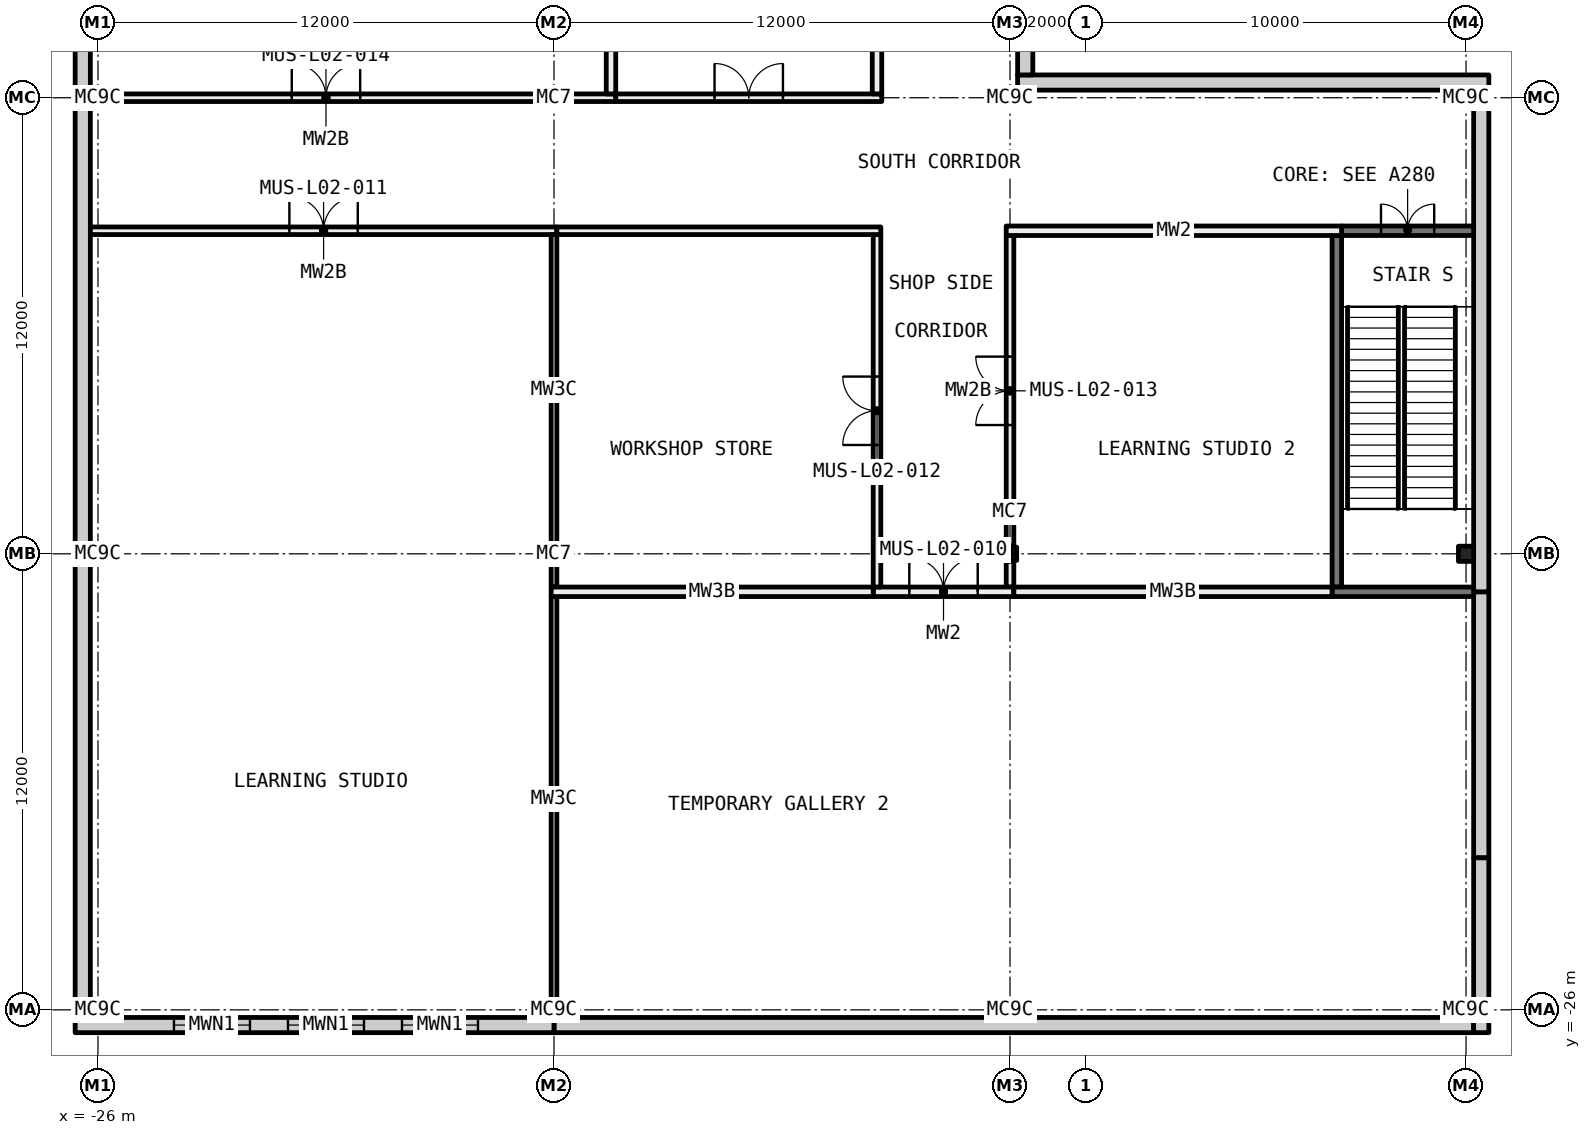
"""IFC4 building model, lengths in metres.
Left out: names, types, materials, properties, quantities, classifications, styles, units other than length and angle.
Written with IfcOpenShell. Run it as: python <this file> out.ifc"""

import sys

from ifc_helpers import new_model, si_unit, direction, frame, frame_2d, origin, origin_2d, place, context, subcontext, project, spatial, rectangle, i_section, extrude, element, fill, save


model = new_model("IFC4")
c1 = context("Model", 3, precision=1e-05, world=origin(), true_north=direction((0.0, 1.0)))
c2 = subcontext(c1, "Body", "Model", "MODEL_VIEW")
j1 = project(units=[si_unit("LENGTHUNIT", "METRE"), si_unit("PLANEANGLEUNIT", "RADIAN")], contexts=[c1])
p1 = place(None, origin())
s1 = spatial("IfcSite", under=j1, at=p1, CompositionType="ELEMENT")
p2 = place(p1, origin())
s2 = spatial("IfcBuilding", under=s1, at=p2, CompositionType="ELEMENT")
p3 = place(p2, frame((0.0, 0.0, 12.0)))
s3 = spatial("IfcBuildingStorey", under=s2, at=p3, CompositionType="ELEMENT", Elevation=12.0)
for number, where, z_axis, x_axis in (
    (1, (-26.0, -26.0, 0.0), (0.0, 0.0, 1.0), (1.0, 0.0, 0.0)),
    (2, (-26.0, -14.0, 0.0), (0.0, 0.0, 1.0), (1.0, 0.0, 0.0)),
    (3, (-26.0, -2.0, 0.0), (0.0, 0.0, 1.0), (1.0, 0.0, 0.0)),
    (4, (-14.0, -26.0, 0.0), (0.0, 0.0, 1.0), (1.0, 0.0, 0.0)),
):
    element("IfcColumn", number, at=place(p3, frame(where, z_axis=z_axis, x_axis=x_axis)), inside=s3, PredefinedType="COLUMN", context=c2, shape_type="SweptSolid", body=[
        extrude(i_section(OverallWidth=0.4, OverallDepth=0.4, WebThickness=0.013, FlangeThickness=0.021, FilletRadius=0.022, at=origin_2d()), origin(), (0.0, 0.0, 1.0), 5.6),
    ])
for number, where, z_axis, x_axis in (
    (5, (-14.0, -14.0, 0.0), (0.0, 0.0, 1.0), (1.0, 0.0, 0.0)),
    (6, (-14.0, -2.0, 0.0), (0.0, 0.0, 1.0), (1.0, 0.0, 0.0)),
):
    element("IfcColumn", number, at=place(p3, frame(where, z_axis=z_axis, x_axis=x_axis)), inside=s3, PredefinedType="COLUMN", context=c2, shape_type="SweptSolid", body=[
        extrude(i_section(OverallWidth=0.35, OverallDepth=0.35, WebThickness=0.012, FlangeThickness=0.019, FilletRadius=0.013, at=origin_2d()), origin(), (0.0, 0.0, 1.0), 5.6),
    ])
p4 = place(p3, frame((-2.0, -26.0, 0.0), z_axis=(0.0, 0.0, 1.0), x_axis=(1.0, 0.0, 0.0)))
e7 = element("IfcColumn", 7, at=p4, inside=s3, PredefinedType="COLUMN", context=c2, shape_type="SweptSolid", body=[
    extrude(i_section(OverallWidth=0.4, OverallDepth=0.4, WebThickness=0.013, FlangeThickness=0.021, FilletRadius=0.022, at=origin_2d()), origin(), (0.0, 0.0, 1.0), 5.6),
])
p5 = place(p3, frame((-2.0, -14.0, 0.0), z_axis=(0.0, 0.0, 1.0), x_axis=(1.0, 0.0, 0.0)))
e8 = element("IfcColumn", 8, at=p5, inside=s3, PredefinedType="COLUMN", context=c2, shape_type="SweptSolid", body=[
    extrude(i_section(OverallWidth=0.35, OverallDepth=0.35, WebThickness=0.012, FlangeThickness=0.019, FilletRadius=0.013, at=origin_2d()), origin(), (0.0, 0.0, 1.0), 5.6),
])
for number, where, z_axis, x_axis in (
    (9, (-2.0, -2.0, 0.0), (0.0, 0.0, 1.0), (1.0, 0.0, 0.0)),
    (10, (10.0, -26.0, 0.0), (0.0, 0.0, 1.0), (1.0, 0.0, 0.0)),
    (11, (10.0, -14.0, 0.0), (0.0, 0.0, 1.0), (1.0, 0.0, 0.0)),
    (12, (10.0, -2.0, 0.0), (0.0, 0.0, 1.0), (1.0, 0.0, 0.0)),
):
    element("IfcColumn", number, at=place(p3, frame(where, z_axis=z_axis, x_axis=x_axis)), inside=s3, PredefinedType="COLUMN", context=c2, shape_type="SweptSolid", body=[
        extrude(i_section(OverallWidth=0.4, OverallDepth=0.4, WebThickness=0.013, FlangeThickness=0.021, FilletRadius=0.022, at=origin_2d()), origin(), (0.0, 0.0, 1.0), 5.6),
    ])
p6 = place(p3, frame((-25.8, -2.0, 0.0), z_axis=(0.0, 0.0, 1.0), x_axis=(1.0, 0.0, 0.0)))
e13 = element("IfcWall", 13, at=p6, inside=s3, PredefinedType="PARTITIONING", context=c2, shape_type="SweptSolid", body=[
    extrude(rectangle(XDim=11.6, YDim=0.2, at=frame_2d((5.8, 0.0))), origin(), (0.0, 0.0, 1.0), 5.012),
])
p7 = place(p6, frame((4.9, 0.0, 0.0)))
e14 = element("IfcOpeningElement", 14, at=p7, cuts=e13, PredefinedType="OPENING", context=c2, shape_type="SweptSolid", body=[
    extrude(rectangle(XDim=1.8, YDim=2.1, at=frame_2d((0.9, 1.05))), frame((0.0, 0.11, 0.0), z_axis=(0.0, -1.0, 0.0), x_axis=(1.0, 0.0, 0.0)), (0.0, 0.0, 1.0), 0.22),
])
p8 = place(p3, frame((-13.8, -2.0, 0.0), z_axis=(0.0, 0.0, 1.0), x_axis=(1.0, 0.0, 0.0)))
e15 = element("IfcWall", 15, at=p8, inside=s3, PredefinedType="PARTITIONING", context=c2, shape_type="SweptSolid", body=[
    extrude(rectangle(XDim=1.425, YDim=0.2, at=frame_2d((0.712, 0.0))), origin(), (0.0, 0.0, 1.0), 5.012),
])
p9 = place(p3, frame((-26.2, -5.5, 0.0), z_axis=(0.0, 0.0, 1.0), x_axis=(1.0, 0.0, 0.0)))
e16 = element("IfcWall", 16, at=p9, inside=s3, PredefinedType="PARTITIONING", context=c2, shape_type="SweptSolid", body=[
    extrude(rectangle(XDim=12.275, YDim=0.2, at=frame_2d((6.137, 0.0))), origin(), (0.0, 0.0, 1.0), 5.6),
])
p10 = place(p9, frame((5.237, 0.0, 0.0)))
e17 = element("IfcOpeningElement", 17, at=p10, cuts=e16, PredefinedType="OPENING", context=c2, shape_type="SweptSolid", body=[
    extrude(rectangle(XDim=1.8, YDim=2.1, at=frame_2d((0.9, 1.05))), frame((0.0, 0.11, 0.0), z_axis=(0.0, -1.0, 0.0), x_axis=(1.0, 0.0, 0.0)), (0.0, 0.0, 1.0), 0.22),
])
p11 = place(p3, frame((-2.0, -14.875, 0.0), z_axis=(0.0, 0.0, 1.0), x_axis=(0.0, 1.0, 0.0)))
e18 = element("IfcWall", 18, at=p11, inside=s3, PredefinedType="PARTITIONING", context=c2, shape_type="SweptSolid", body=[
    extrude(rectangle(XDim=0.675, YDim=0.2, at=frame_2d((0.337, 0.0))), origin(), (0.0, 0.0, 1.0), 5.012),
])
p12 = place(p3, frame((-2.0, -13.8, 0.0), z_axis=(0.0, 0.0, 1.0), x_axis=(0.0, 1.0, 0.0)))
e19 = element("IfcWall", 19, at=p12, inside=s3, PredefinedType="PARTITIONING", context=c2, shape_type="SweptSolid", body=[
    extrude(rectangle(XDim=8.175, YDim=0.2, at=frame_2d((4.087, 0.0))), origin(), (0.0, 0.0, 1.0), 5.012),
])
p13 = place(p12, frame((3.188, 0.0, 0.0)))
e20 = element("IfcOpeningElement", 20, at=p13, cuts=e19, PredefinedType="OPENING", context=c2, shape_type="SweptSolid", body=[
    extrude(rectangle(XDim=1.8, YDim=2.1, at=frame_2d((0.9, 1.05))), frame((0.0, 0.11, 0.0), z_axis=(0.0, -1.0, 0.0), x_axis=(1.0, 0.0, 0.0)), (0.0, 0.0, 1.0), 0.22),
])
p14 = place(p3, frame((-2.1, -5.5, 0.0), z_axis=(0.0, 0.0, 1.0), x_axis=(1.0, 0.0, 0.0)))
e21 = element("IfcWall", 21, at=p14, inside=s3, PredefinedType="PARTITIONING", context=c2, shape_type="SweptSolid", body=[
    extrude(rectangle(XDim=8.825, YDim=0.25, at=frame_2d((4.413, 0.0))), origin(), (0.0, 0.0, 1.0), 5.6),
])
p15 = place(p3, frame((-12.375, -2.0, 0.0), z_axis=(0.0, 0.0, 1.0), x_axis=(1.0, 0.0, 0.0)))
e22 = element("IfcWall", 22, at=p15, inside=s3, PredefinedType="PARTITIONING", context=c2, shape_type="SweptSolid", body=[
    extrude(rectangle(XDim=7.0, YDim=0.2, at=frame_2d((3.5, 0.0))), origin(), (0.0, 0.0, 1.0), 5.012),
])
p16 = place(p15, frame((2.6, 0.0, 0.0)))
e23 = element("IfcOpeningElement", 23, at=p16, cuts=e22, PredefinedType="OPENING", context=c2, shape_type="SweptSolid", body=[
    extrude(rectangle(XDim=1.8, YDim=2.1, at=frame_2d((0.9, 1.05))), frame((0.0, 0.11, 0.0), z_axis=(0.0, -1.0, 0.0), x_axis=(1.0, 0.0, 0.0)), (0.0, 0.0, 1.0), 0.22),
])
p17 = place(p3, frame((-5.5, -1.9, 0.0), z_axis=(0.0, 0.0, 1.0), x_axis=(0.0, 1.0, 0.0)))
e24 = element("IfcWall", 24, at=p17, inside=s3, PredefinedType="PARTITIONING", context=c2, shape_type="SweptSolid", body=[
    extrude(rectangle(XDim=2.975, YDim=0.25, at=frame_2d((1.487, 0.0))), origin(), (0.0, 0.0, 1.0), 5.6),
])
p18 = place(p3, frame((6.725, -5.5, 0.0), z_axis=(0.0, 0.0, 1.0), x_axis=(1.0, 0.0, 0.0)))
e25 = element("IfcWall", 25, at=p18, inside=s3, PredefinedType="SHEAR", context=c2, shape_type="SweptSolid", body=[
    extrude(rectangle(XDim=3.475, YDim=0.25, at=frame_2d((1.737, 0.0))), origin(), (0.0, 0.0, 1.0), 5.6),
])
p19 = place(p18, frame((1.037, 0.0, 0.0)))
e26 = element("IfcOpeningElement", 26, at=p19, cuts=e25, PredefinedType="OPENING", context=c2, shape_type="SweptSolid", body=[
    extrude(rectangle(XDim=1.4, YDim=2.1, at=frame_2d((0.7, 1.05))), frame((0.0, 0.135, 0.0), z_axis=(0.0, -1.0, 0.0), x_axis=(1.0, 0.0, 0.0)), (0.0, 0.0, 1.0), 0.27),
])
p20 = place(p3, frame((-5.6, -15.0, 0.0), z_axis=(0.0, 0.0, 1.0), x_axis=(1.0, 0.0, 0.0)))
e27 = element("IfcWall", 27, at=p20, inside=s3, PredefinedType="PARTITIONING", context=c2, shape_type="SweptSolid", body=[
    extrude(rectangle(XDim=3.7, YDim=0.25, at=frame_2d((1.85, 0.0))), origin(), (0.0, 0.0, 1.0), 5.6),
])
p21 = place(p20, frame((0.95, 0.0, 0.0)))
e28 = element("IfcOpeningElement", 28, at=p21, cuts=e27, PredefinedType="OPENING", context=c2, shape_type="SweptSolid", body=[
    extrude(rectangle(XDim=1.8, YDim=2.1, at=frame_2d((0.9, 1.05))), frame((0.0, 0.135, 0.0), z_axis=(0.0, -1.0, 0.0), x_axis=(1.0, 0.0, 0.0)), (0.0, 0.0, 1.0), 0.27),
])
p22 = place(p3, frame((-5.5, -14.875, 0.0), z_axis=(0.0, 0.0, 1.0), x_axis=(0.0, 1.0, 0.0)))
e29 = element("IfcWall", 29, at=p22, inside=s3, PredefinedType="PARTITIONING", context=c2, shape_type="SweptSolid", body=[
    extrude(rectangle(XDim=9.275, YDim=0.2, at=frame_2d((4.637, 0.0))), origin(), (0.0, 0.0, 1.0), 5.6),
])
p23 = place(p22, frame((3.738, 0.0, 0.0)))
e30 = element("IfcOpeningElement", 30, at=p23, cuts=e29, PredefinedType="OPENING", context=c2, shape_type="SweptSolid", body=[
    extrude(rectangle(XDim=1.8, YDim=2.1, at=frame_2d((0.9, 1.05))), frame((0.0, 0.11, 0.0), z_axis=(0.0, -1.0, 0.0), x_axis=(1.0, 0.0, 0.0)), (0.0, 0.0, 1.0), 0.22),
])
p24 = place(p3, frame((-13.925, -5.5, 0.0), z_axis=(0.0, 0.0, 1.0), x_axis=(1.0, 0.0, 0.0)))
e31 = element("IfcWall", 31, at=p24, inside=s3, PredefinedType="PARTITIONING", context=c2, shape_type="SweptSolid", body=[
    extrude(rectangle(XDim=8.525, YDim=0.2, at=frame_2d((4.263, 0.0))), origin(), (0.0, 0.0, 1.0), 5.6),
])
p25 = place(p3, frame((-14.0, -14.875, 0.0), z_axis=(0.0, 0.0, 1.0), x_axis=(0.0, 1.0, 0.0)))
e32 = element("IfcWall", 32, at=p25, inside=s3, PredefinedType="PARTITIONING", context=c2, shape_type="SweptSolid", body=[
    extrude(rectangle(XDim=0.675, YDim=0.15, at=frame_2d((0.337, 0.0))), origin(), (0.0, 0.0, 1.0), 5.012),
])
p26 = place(p3, frame((-14.0, -13.8, 0.0), z_axis=(0.0, 0.0, 1.0), x_axis=(0.0, 1.0, 0.0)))
e33 = element("IfcWall", 33, at=p26, inside=s3, PredefinedType="PARTITIONING", context=c2, shape_type="SweptSolid", body=[
    extrude(rectangle(XDim=8.2, YDim=0.15, at=frame_2d((4.1, 0.0))), origin(), (0.0, 0.0, 1.0), 5.012),
])
p27 = place(p3, frame((-12.5, -1.9, 0.0), z_axis=(0.0, 0.0, 1.0), x_axis=(0.0, 1.0, 0.0)))
e34 = element("IfcWall", 34, at=p27, inside=s3, PredefinedType="PARTITIONING", context=c2, shape_type="SweptSolid", body=[
    extrude(rectangle(XDim=2.975, YDim=0.25, at=frame_2d((1.487, 0.0))), origin(), (0.0, 0.0, 1.0), 5.6),
])
p28 = place(p3, frame((6.6, -14.875, 0.0), z_axis=(0.0, 0.0, 1.0), x_axis=(0.0, 1.0, 0.0)))
e35 = element("IfcWall", 35, at=p28, inside=s3, PredefinedType="SHEAR", context=c2, shape_type="SweptSolid", body=[
    extrude(rectangle(XDim=9.25, YDim=0.25, at=frame_2d((4.625, 0.0))), origin(), (0.0, 0.0, 1.0), 5.6),
])
p29 = place(p3, frame((6.475, -15.0, 0.0), z_axis=(0.0, 0.0, 1.0), x_axis=(1.0, 0.0, 0.0)))
e36 = element("IfcWall", 36, at=p29, inside=s3, PredefinedType="SHEAR", context=c2, shape_type="SweptSolid", body=[
    extrude(rectangle(XDim=3.725, YDim=0.25, at=frame_2d((1.862, 0.0))), origin(), (0.0, 0.0, 1.0), 5.6),
])
p30 = place(p3, frame((-14.0, -25.8, 0.0), z_axis=(0.0, 0.0, 1.0), x_axis=(0.0, 1.0, 0.0)))
e37 = element("IfcWall", 37, at=p30, inside=s3, PredefinedType="PARTITIONING", context=c2, shape_type="SweptSolid", body=[
    extrude(rectangle(XDim=10.675, YDim=0.15, at=frame_2d((5.337, 0.0))), origin(), (0.0, 0.0, 1.0), 5.012),
])
p31 = place(p3, frame((-1.9, -15.0, 0.0), z_axis=(0.0, 0.0, 1.0), x_axis=(1.0, 0.0, 0.0)))
e38 = element("IfcWall", 38, at=p31, inside=s3, PredefinedType="PARTITIONING", context=c2, shape_type="SweptSolid", body=[
    extrude(rectangle(XDim=8.375, YDim=0.25, at=frame_2d((4.188, 0.0))), origin(), (0.0, 0.0, 1.0), 5.6),
])
p32 = place(p3, frame((-14.075, -15.0, 0.0), z_axis=(0.0, 0.0, 1.0), x_axis=(1.0, 0.0, 0.0)))
e39 = element("IfcWall", 39, at=p32, inside=s3, PredefinedType="PARTITIONING", context=c2, shape_type="SweptSolid", body=[
    extrude(rectangle(XDim=8.475, YDim=0.25, at=frame_2d((4.237, 0.0))), origin(), (0.0, 0.0, 1.0), 5.6),
])
p33 = place(p3, frame((-14.0, -26.4, 0.0), z_axis=(0.0, 0.0, 1.0), x_axis=(1.0, 0.0, 0.0)))
e40 = element("IfcWall", 40, at=p33, inside=s3, PredefinedType="STANDARD", context=c2, shape_type="SweptSolid", body=[
    extrude(rectangle(XDim=24.2, YDim=0.4, at=frame_2d((12.1, 0.0))), origin(), (0.0, 0.0, 1.0), 5.6),
])
p34 = place(p3, frame((10.4, -22.0, 0.0), z_axis=(0.0, 0.0, 1.0), x_axis=(0.0, 1.0, 0.0)))
e41 = element("IfcWall", 41, at=p34, inside=s3, PredefinedType="STANDARD", context=c2, shape_type="SweptSolid", body=[
    extrude(rectangle(XDim=7.0, YDim=0.4, at=frame_2d((3.5, 0.0))), origin(), (0.0, 0.0, 1.0), 5.6),
])
p35 = place(p3, frame((-26.6, -26.4, -0.4), z_axis=(0.0, 0.0, 1.0), x_axis=(1.0, 0.0, 0.0)))
e42 = element("IfcWall", 42, at=p35, inside=s3, PredefinedType="STANDARD", context=c2, shape_type="SweptSolid", body=[
    extrude(rectangle(XDim=12.6, YDim=0.4, at=frame_2d((6.3, 0.0))), origin(), (0.0, 0.0, 1.0), 6.0),
])
p36 = place(p35, frame((2.6, 0.0, 1.3)))
e43 = element("IfcOpeningElement", 43, at=p36, cuts=e42, PredefinedType="OPENING", context=c2, shape_type="SweptSolid", body=[
    extrude(rectangle(XDim=2.0, YDim=3.6, at=frame_2d((1.0, 1.8))), frame((0.0, 0.21, 0.0), z_axis=(0.0, -1.0, 0.0), x_axis=(1.0, 0.0, 0.0)), (0.0, 0.0, 1.0), 0.42),
])
p37 = place(p35, frame((5.6, 0.0, 1.3)))
e44 = element("IfcOpeningElement", 44, at=p37, cuts=e42, PredefinedType="OPENING", context=c2, shape_type="SweptSolid", body=[
    extrude(rectangle(XDim=2.0, YDim=3.6, at=frame_2d((1.0, 1.8))), frame((0.0, 0.21, 0.0), z_axis=(0.0, -1.0, 0.0), x_axis=(1.0, 0.0, 0.0)), (0.0, 0.0, 1.0), 0.42),
])
p38 = place(p35, frame((8.6, 0.0, 1.3)))
e45 = element("IfcOpeningElement", 45, at=p38, cuts=e42, PredefinedType="OPENING", context=c2, shape_type="SweptSolid", body=[
    extrude(rectangle(XDim=2.0, YDim=3.6, at=frame_2d((1.0, 1.8))), frame((0.0, 0.21, 0.0), z_axis=(0.0, -1.0, 0.0), x_axis=(1.0, 0.0, 0.0)), (0.0, 0.0, 1.0), 0.42),
])
p39 = place(p3, frame((10.4, -26.6, -0.4), z_axis=(0.0, 0.0, 1.0), x_axis=(0.0, 1.0, 0.0)))
e46 = element("IfcWall", 46, at=p39, inside=s3, PredefinedType="STANDARD", context=c2, shape_type="SweptSolid", body=[
    extrude(rectangle(XDim=4.6, YDim=0.4, at=frame_2d((2.3, 0.0))), origin(), (0.0, 0.0, 1.0), 6.0),
])
p40 = place(p3, frame((-26.4, -26.2, -0.4), z_axis=(0.0, 0.0, 1.0), x_axis=(0.0, 1.0, 0.0)))
e47 = element("IfcWall", 47, at=p40, inside=s3, PredefinedType="STANDARD", context=c2, shape_type="SweptSolid", body=[
    extrude(rectangle(XDim=72.4, YDim=0.4, at=frame_2d((36.2, 0.0))), origin(), (0.0, 0.0, 1.0), 6.0),
])
p41 = place(p3, frame((10.4, -15.0, -0.4), z_axis=(0.0, 0.0, 1.0), x_axis=(0.0, 1.0, 0.0)))
e48 = element("IfcWall", 48, at=p41, inside=s3, PredefinedType="STANDARD", context=c2, shape_type="SweptSolid", body=[
    extrude(rectangle(XDim=13.2, YDim=0.4, at=frame_2d((6.6, 0.0))), origin(), (0.0, 0.0, 1.0), 6.0),
])
p42 = place(p3, frame((-1.8, -1.6, -0.4), z_axis=(0.0, 0.0, 1.0), x_axis=(1.0, 0.0, 0.0)))
e49 = element("IfcWall", 49, at=p42, inside=s3, PredefinedType="STANDARD", context=c2, shape_type="SweptSolid", body=[
    extrude(rectangle(XDim=12.4, YDim=0.4, at=frame_2d((6.2, 0.0))), origin(), (0.0, 0.0, 1.0), 6.0),
])
p43 = place(p3, frame((-1.6, -1.4, -0.4), z_axis=(0.0, 0.0, 1.0), x_axis=(0.0, 1.0, 0.0)))
e50 = element("IfcWall", 50, at=p43, inside=s3, PredefinedType="STANDARD", context=c2, shape_type="SweptSolid", body=[
    extrude(rectangle(XDim=47.6, YDim=0.4, at=frame_2d((23.8, 0.0))), origin(), (0.0, 0.0, 1.0), 6.0),
])
p44 = place(p36, origin())
e51 = element("IfcWindow", 51, at=p44, inside=s3, PartitioningType="SINGLE_PANEL", PredefinedType="WINDOW", context=c2, shape_type="SweptSolid", body=[
    extrude(rectangle(XDim=2.0, YDim=3.6, at=frame_2d((1.0, 1.8))), frame((0.0, 0.03, 0.0), z_axis=(0.0, -1.0, 0.0), x_axis=(1.0, 0.0, 0.0)), (0.0, 0.0, 1.0), 0.06),
])
fill(e43, e51)
p45 = place(p37, origin())
e52 = element("IfcWindow", 52, at=p45, inside=s3, PartitioningType="SINGLE_PANEL", PredefinedType="WINDOW", context=c2, shape_type="SweptSolid", body=[
    extrude(rectangle(XDim=2.0, YDim=3.6, at=frame_2d((1.0, 1.8))), frame((0.0, 0.03, 0.0), z_axis=(0.0, -1.0, 0.0), x_axis=(1.0, 0.0, 0.0)), (0.0, 0.0, 1.0), 0.06),
])
fill(e44, e52)
p46 = place(p38, origin())
e53 = element("IfcWindow", 53, at=p46, inside=s3, PartitioningType="SINGLE_PANEL", PredefinedType="WINDOW", context=c2, shape_type="SweptSolid", body=[
    extrude(rectangle(XDim=2.0, YDim=3.6, at=frame_2d((1.0, 1.8))), frame((0.0, 0.03, 0.0), z_axis=(0.0, -1.0, 0.0), x_axis=(1.0, 0.0, 0.0)), (0.0, 0.0, 1.0), 0.06),
])
fill(e45, e53)
p47 = place(p19, origin())
e54 = element("IfcDoor", 54, at=p47, inside=s3, OperationType="DOUBLE_DOOR_SINGLE_SWING", PredefinedType="DOOR", context=c2, shape_type="SweptSolid", body=[
    extrude(rectangle(XDim=1.4, YDim=2.1, at=frame_2d((0.7, 1.05))), frame((0.0, 0.025, 0.0), z_axis=(0.0, -1.0, 0.0), x_axis=(1.0, 0.0, 0.0)), (0.0, 0.0, 1.0), 0.05),
])
fill(e26, e54)
p48 = place(p16, origin())
e55 = element("IfcDoor", 55, at=p48, inside=s3, OperationType="DOUBLE_DOOR_SINGLE_SWING", PredefinedType="DOOR", context=c2, shape_type="SweptSolid", body=[
    extrude(rectangle(XDim=1.8, YDim=2.1, at=frame_2d((0.9, 1.05))), frame((0.0, 0.025, 0.0), z_axis=(0.0, -1.0, 0.0), x_axis=(1.0, 0.0, 0.0)), (0.0, 0.0, 1.0), 0.05),
])
fill(e23, e55)
p49 = place(p21, origin())
e56 = element("IfcDoor", 56, at=p49, inside=s3, OperationType="DOUBLE_DOOR_SINGLE_SWING", PredefinedType="DOOR", context=c2, shape_type="SweptSolid", body=[
    extrude(rectangle(XDim=1.8, YDim=2.1, at=frame_2d((0.9, 1.05))), frame((0.0, 0.025, 0.0), z_axis=(0.0, -1.0, 0.0), x_axis=(1.0, 0.0, 0.0)), (0.0, 0.0, 1.0), 0.05),
])
fill(e28, e56)
p50 = place(p10, origin())
e57 = element("IfcDoor", 57, at=p50, inside=s3, OperationType="DOUBLE_DOOR_SINGLE_SWING", PredefinedType="DOOR", context=c2, shape_type="SweptSolid", body=[
    extrude(rectangle(XDim=1.8, YDim=2.1, at=frame_2d((0.9, 1.05))), frame((0.0, 0.025, 0.0), z_axis=(0.0, -1.0, 0.0), x_axis=(1.0, 0.0, 0.0)), (0.0, 0.0, 1.0), 0.05),
])
fill(e17, e57)
p51 = place(p23, origin())
e58 = element("IfcDoor", 58, at=p51, inside=s3, OperationType="DOUBLE_DOOR_SINGLE_SWING", PredefinedType="DOOR", context=c2, shape_type="SweptSolid", body=[
    extrude(rectangle(XDim=1.8, YDim=2.1, at=frame_2d((0.9, 1.05))), frame((0.0, 0.025, 0.0), z_axis=(0.0, -1.0, 0.0), x_axis=(1.0, 0.0, 0.0)), (0.0, 0.0, 1.0), 0.05),
])
fill(e30, e58)
p52 = place(p13, origin())
e59 = element("IfcDoor", 59, at=p52, inside=s3, OperationType="DOUBLE_DOOR_SINGLE_SWING", PredefinedType="DOOR", context=c2, shape_type="SweptSolid", body=[
    extrude(rectangle(XDim=1.8, YDim=2.1, at=frame_2d((0.9, 1.05))), frame((0.0, 0.025, 0.0), z_axis=(0.0, -1.0, 0.0), x_axis=(1.0, 0.0, 0.0)), (0.0, 0.0, 1.0), 0.05),
])
fill(e20, e59)
p53 = place(p7, origin())
e60 = element("IfcDoor", 60, at=p53, inside=s3, OperationType="DOUBLE_DOOR_SINGLE_SWING", PredefinedType="DOOR", context=c2, shape_type="SweptSolid", body=[
    extrude(rectangle(XDim=1.8, YDim=2.1, at=frame_2d((0.9, 1.05))), frame((0.0, 0.025, 0.0), z_axis=(0.0, -1.0, 0.0), x_axis=(1.0, 0.0, 0.0)), (0.0, 0.0, 1.0), 0.05),
])
fill(e14, e60)
save(model, sys.argv[1])
